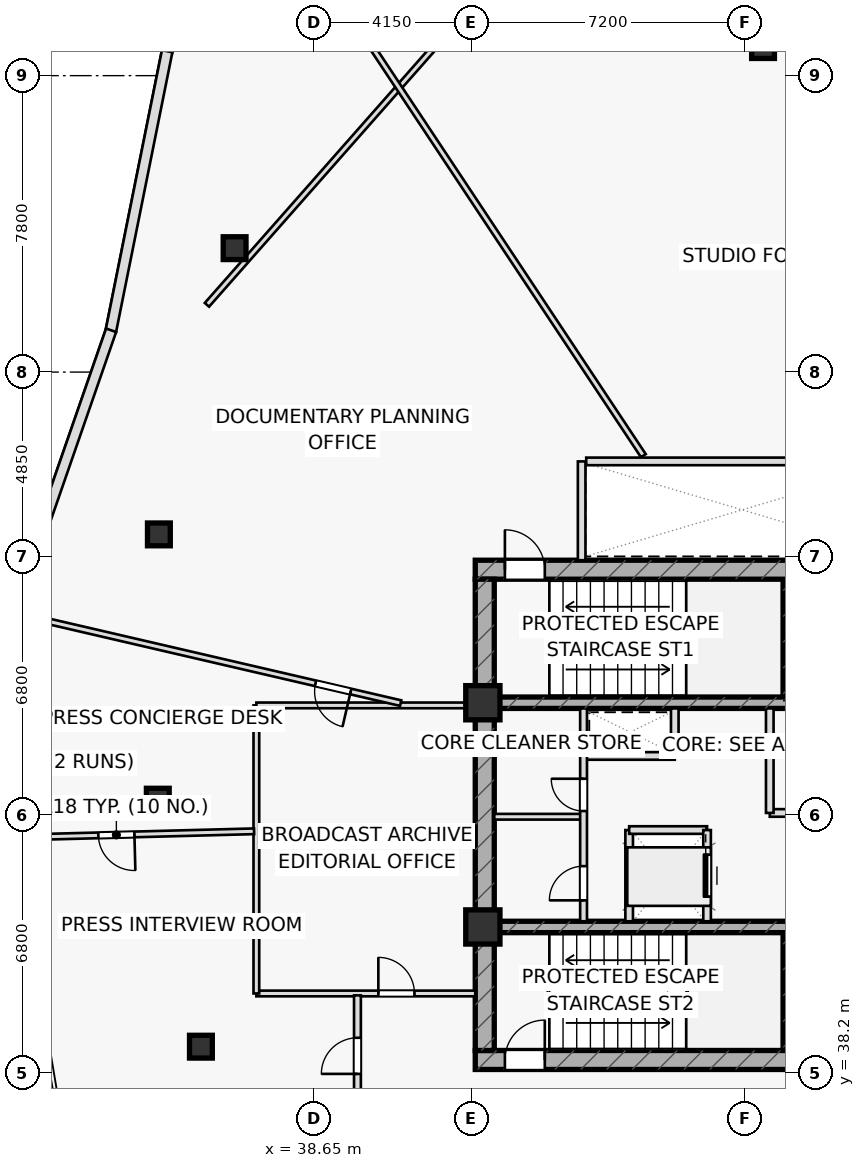
"""IFC4 building model, lengths in metres.
Left out: names, types, materials, properties, quantities, classifications, styles, units other than length and angle.
Written with IfcOpenShell. Run it as: python <this file> out.ifc"""

import sys

from ifc_helpers import new_model, si_unit, direction, frame, frame_2d, origin, origin_2d, place, context, subcontext, project, spatial, rectangle, hollow_rectangle, extrude, element, fill, save


model = new_model("IFC4")
c1 = context("Model", 3, precision=1e-05, world=origin(), true_north=direction((0.0, 1.0)))
c2 = subcontext(c1, "Body", "Model", "MODEL_VIEW")
j1 = project(units=[si_unit("LENGTHUNIT", "METRE"), si_unit("PLANEANGLEUNIT", "RADIAN")], contexts=[c1])
p1 = place(None, origin())
s1 = spatial("IfcSite", under=j1, at=p1, CompositionType="ELEMENT")
p2 = place(p1, origin())
s2 = spatial("IfcBuilding", under=s1, at=p2, CompositionType="ELEMENT")
p3 = place(p2, frame((0.0, 0.0, 184.9)))
s3 = spatial("IfcBuildingStorey", under=s2, at=p3, CompositionType="ELEMENT", Elevation=184.9)
for number, where, z_axis, x_axis in (
    (1, (51.11, 48.1, 0.0), (0.0, 0.0, 1.0), (0.0, 1.0, 0.0)),
    (2, (51.11, 38.8, 0.0), (0.0, 0.0, 1.0), (0.0, 1.0, 0.0)),
):
    element("IfcWall", number, at=place(p3, frame(where, z_axis=z_axis, x_axis=x_axis)), inside=s3, PredefinedType="SHEAR", context=c2, shape_type="SweptSolid", body=[
        extrude(rectangle(XDim=3.1, YDim=0.22, at=frame_2d((1.55, 0.0))), origin(), (0.0, 0.0, 1.0), 3.55),
    ])
p4 = place(p3, frame((42.9, 51.45, 0.0), z_axis=(0.0, 0.0, 1.0), x_axis=(1.0, 0.0, 0.0)))
e3 = element("IfcWall", 3, at=p4, inside=s3, PredefinedType="SHEAR", context=c2, shape_type="SweptSolid", body=[
    extrude(rectangle(XDim=14.2, YDim=0.5, at=frame_2d((7.1, 0.0))), origin(), (0.0, 0.0, 1.0), 3.55),
])
p5 = place(p4, frame((0.78, 0.0, 0.0)))
e4 = element("IfcOpeningElement", 4, at=p5, cuts=e3, PredefinedType="OPENING", context=c2, shape_type="SweptSolid", body=[
    extrude(rectangle(XDim=1.05, YDim=2.2, at=frame_2d((0.525, 1.1))), frame((0.0, 0.26, 0.0), z_axis=(0.0, -1.0, 0.0), x_axis=(1.0, 0.0, 0.0)), (0.0, 0.0, 1.0), 0.52),
])
p6 = place(p3, frame((42.9, 38.55, 0.0), z_axis=(0.0, 0.0, 1.0), x_axis=(1.0, 0.0, 0.0)))
e5 = element("IfcWall", 5, at=p6, inside=s3, PredefinedType="SHEAR", context=c2, shape_type="SweptSolid", body=[
    extrude(rectangle(XDim=14.2, YDim=0.5, at=frame_2d((7.1, 0.0))), origin(), (0.0, 0.0, 1.0), 3.55),
])
p7 = place(p6, frame((0.78, 0.0, 0.0)))
e6 = element("IfcOpeningElement", 6, at=p7, cuts=e5, PredefinedType="OPENING", context=c2, shape_type="SweptSolid", body=[
    extrude(rectangle(XDim=1.05, YDim=2.2, at=frame_2d((0.525, 1.1))), frame((0.0, 0.26, 0.0), z_axis=(0.0, -1.0, 0.0), x_axis=(1.0, 0.0, 0.0)), (0.0, 0.0, 1.0), 0.52),
])
p8 = place(p3, frame((43.15, 38.8, 0.0), z_axis=(0.0, 0.0, 1.0), x_axis=(0.0, 1.0, 0.0)))
e7 = element("IfcWall", 7, at=p8, inside=s3, PredefinedType="SHEAR", context=c2, shape_type="SweptSolid", body=[
    extrude(rectangle(XDim=12.4, YDim=0.5, at=frame_2d((6.2, 0.0))), origin(), (0.0, 0.0, 1.0), 3.55),
])
p9 = place(p3, frame((43.4, 47.95, 0.0), z_axis=(0.0, 0.0, 1.0), x_axis=(1.0, 0.0, 0.0)))
e8 = element("IfcWall", 8, at=p9, inside=s3, PredefinedType="SHEAR", context=c2, shape_type="SweptSolid", body=[
    extrude(rectangle(XDim=13.2, YDim=0.3, at=frame_2d((6.6, 0.0))), origin(), (0.0, 0.0, 1.0), 3.55),
])
p10 = place(p9, frame((8.345, 0.0, 0.0)))
e9 = element("IfcOpeningElement", 9, at=p10, cuts=e8, PredefinedType="OPENING", context=c2, shape_type="SweptSolid", body=[
    extrude(rectangle(XDim=1.15, YDim=2.2, at=frame_2d((0.575, 1.1))), frame((0.0, 0.16, 0.0), z_axis=(0.0, -1.0, 0.0), x_axis=(1.0, 0.0, 0.0)), (0.0, 0.0, 1.0), 0.32),
])
p11 = place(p9, frame((10.065, 0.0, 0.0)))
e10 = element("IfcOpeningElement", 10, at=p11, cuts=e8, PredefinedType="OPENING", context=c2, shape_type="SweptSolid", body=[
    extrude(rectangle(XDim=1.15, YDim=2.2, at=frame_2d((0.575, 1.1))), frame((0.0, 0.16, 0.0), z_axis=(0.0, -1.0, 0.0), x_axis=(1.0, 0.0, 0.0)), (0.0, 0.0, 1.0), 0.32),
])
p12 = place(p9, frame((11.645, 0.0, 0.0)))
e11 = element("IfcOpeningElement", 11, at=p12, cuts=e8, PredefinedType="OPENING", context=c2, shape_type="SweptSolid", body=[
    extrude(rectangle(XDim=1.15, YDim=2.2, at=frame_2d((0.575, 1.1))), frame((0.0, 0.16, 0.0), z_axis=(0.0, -1.0, 0.0), x_axis=(1.0, 0.0, 0.0)), (0.0, 0.0, 1.0), 0.32),
])
p13 = place(p3, frame((43.4, 42.05, 0.0), z_axis=(0.0, 0.0, 1.0), x_axis=(1.0, 0.0, 0.0)))
e12 = element("IfcWall", 12, at=p13, inside=s3, PredefinedType="SHEAR", context=c2, shape_type="SweptSolid", body=[
    extrude(rectangle(XDim=13.2, YDim=0.3, at=frame_2d((6.6, 0.0))), origin(), (0.0, 0.0, 1.0), 3.55),
])
p14 = place(p13, frame((8.37, 0.0, 0.0)))
e13 = element("IfcOpeningElement", 13, at=p14, cuts=e12, PredefinedType="OPENING", context=c2, shape_type="SweptSolid", body=[
    extrude(rectangle(XDim=1.1, YDim=2.15, at=frame_2d((0.55, 1.075))), frame((0.0, 0.16, 0.0), z_axis=(0.0, -1.0, 0.0), x_axis=(1.0, 0.0, 0.0)), (0.0, 0.0, 1.0), 0.32),
])
p15 = place(p13, frame((10.09, 0.0, 0.0)))
e14 = element("IfcOpeningElement", 14, at=p15, cuts=e12, PredefinedType="OPENING", context=c2, shape_type="SweptSolid", body=[
    extrude(rectangle(XDim=1.1, YDim=2.15, at=frame_2d((0.55, 1.075))), frame((0.0, 0.16, 0.0), z_axis=(0.0, -1.0, 0.0), x_axis=(1.0, 0.0, 0.0)), (0.0, 0.0, 1.0), 0.32),
])
p16 = place(p13, frame((11.83, 0.0, 0.0)))
e15 = element("IfcOpeningElement", 15, at=p16, cuts=e12, PredefinedType="OPENING", context=c2, shape_type="SweptSolid", body=[
    extrude(rectangle(XDim=1.1, YDim=2.15, at=frame_2d((0.55, 1.075))), frame((0.0, 0.16, 0.0), z_axis=(0.0, -1.0, 0.0), x_axis=(1.0, 0.0, 0.0)), (0.0, 0.0, 1.0), 0.32),
])
for number, where, z_axis, x_axis in (
    (16, (43.1, 47.95, 0.0), (0.0, 0.0, 1.0), (1.0, 0.0, 0.0)),
    (17, (43.1, 42.05, 0.0), (0.0, 0.0, 1.0), (1.0, 0.0, 0.0)),
):
    element("IfcColumn", number, at=place(p3, frame(where, z_axis=z_axis, x_axis=x_axis)), inside=s3, PredefinedType="COLUMN", context=c2, shape_type="SweptSolid", body=[
        extrude(rectangle(XDim=0.9, YDim=0.9, at=origin_2d()), origin(), (0.0, 0.0, 1.0), 3.55),
    ])
for number, where, z_axis, x_axis in (
    (18, (36.568, 59.911, 0.0), (0.0, 0.0, 1.0), (1.0, 0.0, 0.0)),
    (19, (34.575, 52.379, 0.0), (0.0, 0.0, 1.0), (1.0, 0.0, 0.0)),
    (20, (34.546, 45.399, 0.0), (0.0, 0.0, 1.0), (1.0, 0.0, 0.0)),
    (21, (35.681, 38.9, 0.0), (0.0, 0.0, 1.0), (1.0, 0.0, 0.0)),
    (22, (50.472, 65.202, 0.0), (0.0, 0.0, 1.0), (1.0, 0.0, 0.0)),
):
    element("IfcColumn", number, at=place(p3, frame(where, z_axis=z_axis, x_axis=x_axis)), inside=s3, PredefinedType="COLUMN", context=c2, shape_type="SweptSolid", body=[
        extrude(hollow_rectangle(XDim=0.6, YDim=0.6, WallThickness=0.036, at=origin_2d()), origin(), (0.0, 0.0, 1.0), 3.55),
    ])
p17 = place(p3, frame((45.7, 51.7, 0.0), z_axis=(0.0, 0.0, 1.0), x_axis=(0.0, 1.0, 0.0)))
e23 = element("IfcWall", 23, at=p17, inside=s3, PredefinedType="PARTITIONING", context=c2, shape_type="SweptSolid", body=[
    extrude(rectangle(XDim=2.6, YDim=0.2, at=frame_2d((1.3, 0.0))), origin(), (0.0, 0.0, 1.0), 3.55),
])
p18 = place(p3, frame((45.75, 46.55, 0.0), z_axis=(0.0, 0.0, 1.0), x_axis=(1.0, 0.0, 0.0)))
e24 = element("IfcWall", 24, at=p18, inside=s3, PredefinedType="PARTITIONING", context=c2, shape_type="SweptSolid", body=[
    extrude(rectangle(XDim=2.4, YDim=0.2, at=frame_2d((1.2, 0.0))), origin(), (0.0, 0.0, 1.0), 3.55),
])
p19 = place(p3, frame((48.15, 46.55, 0.0), z_axis=(0.0, 0.0, 1.0), x_axis=(0.0, 1.0, 0.0)))
e25 = element("IfcWall", 25, at=p19, inside=s3, PredefinedType="PARTITIONING", context=c2, shape_type="SweptSolid", body=[
    extrude(rectangle(XDim=1.25, YDim=0.2, at=frame_2d((0.625, 0.0))), origin(), (0.0, 0.0, 1.0), 3.55),
])
p20 = place(p3, frame((46.95, 42.2, 0.0), z_axis=(0.0, 0.0, 1.0), x_axis=(0.0, 1.0, 0.0)))
e26 = element("IfcWall", 26, at=p20, inside=s3, PredefinedType="PARTITIONING", context=c2, shape_type="SweptSolid", body=[
    extrude(rectangle(XDim=2.4, YDim=0.2, at=frame_2d((1.2, 0.0))), origin(), (0.0, 0.0, 1.0), 3.55),
])
p21 = place(p3, frame((46.95, 44.6, 0.0), z_axis=(0.0, 0.0, 1.0), x_axis=(1.0, 0.0, 0.0)))
e27 = element("IfcWall", 27, at=p21, inside=s3, PredefinedType="PARTITIONING", context=c2, shape_type="SweptSolid", body=[
    extrude(rectangle(XDim=2.05, YDim=0.2, at=frame_2d((1.025, 0.0))), origin(), (0.0, 0.0, 1.0), 3.55),
])
p22 = place(p3, frame((50.65, 45.05, 0.0), z_axis=(0.0, 0.0, 1.0), x_axis=(1.0, 0.0, 0.0)))
e28 = element("IfcWall", 28, at=p22, inside=s3, PredefinedType="PARTITIONING", context=c2, shape_type="SweptSolid", body=[
    extrude(rectangle(XDim=5.95, YDim=0.2, at=frame_2d((2.975, 0.0))), origin(), (0.0, 0.0, 1.0), 3.55),
])
p23 = place(p22, frame((1.35, 0.0, 0.0)))
e29 = element("IfcOpeningElement", 29, at=p23, cuts=e28, PredefinedType="OPENING", context=c2, shape_type="SweptSolid", body=[
    extrude(rectangle(XDim=1.5, YDim=2.2, at=frame_2d((0.75, 1.1))), frame((0.0, 0.11, 0.0), z_axis=(0.0, -1.0, 0.0), x_axis=(1.0, 0.0, 0.0)), (0.0, 0.0, 1.0), 0.22),
])
p24 = place(p3, frame((50.65, 45.05, 0.0), z_axis=(0.0, 0.0, 1.0), x_axis=(0.0, 1.0, 0.0)))
e30 = element("IfcWall", 30, at=p24, inside=s3, PredefinedType="PARTITIONING", context=c2, shape_type="SweptSolid", body=[
    extrude(rectangle(XDim=2.75, YDim=0.2, at=frame_2d((1.375, 0.0))), origin(), (0.0, 0.0, 1.0), 3.55),
])
p25 = place(p3, frame((43.4, 44.95, 0.0), z_axis=(0.0, 0.0, 1.0), x_axis=(1.0, 0.0, 0.0)))
e31 = element("IfcWall", 31, at=p25, inside=s3, PredefinedType="PARTITIONING", context=c2, shape_type="SweptSolid", body=[
    extrude(rectangle(XDim=2.35, YDim=0.15, at=frame_2d((1.175, 0.0))), origin(), (0.0, 0.0, 1.0), 3.55),
])
p26 = place(p3, frame((45.75, 42.2, 0.0), z_axis=(0.0, 0.0, 1.0), x_axis=(0.0, 1.0, 0.0)))
e32 = element("IfcWall", 32, at=p26, inside=s3, PredefinedType="PARTITIONING", context=c2, shape_type="SweptSolid", body=[
    extrude(rectangle(XDim=5.6, YDim=0.18, at=frame_2d((2.8, 0.0))), origin(), (0.0, 0.0, 1.0), 3.55),
])
p27 = place(p26, frame((0.55, 0.0, 0.0)))
e33 = element("IfcOpeningElement", 33, at=p27, cuts=e32, PredefinedType="OPENING", context=c2, shape_type="SweptSolid", body=[
    extrude(rectangle(XDim=0.9, YDim=2.05, at=frame_2d((0.45, 1.025))), frame((0.0, 0.1, 0.0), z_axis=(0.0, -1.0, 0.0), x_axis=(1.0, 0.0, 0.0)), (0.0, 0.0, 1.0), 0.2),
])
p28 = place(p26, frame((2.9, 0.0, 0.0)))
e34 = element("IfcOpeningElement", 34, at=p28, cuts=e32, PredefinedType="OPENING", context=c2, shape_type="SweptSolid", body=[
    extrude(rectangle(XDim=0.85, YDim=2.05, at=frame_2d((0.425, 1.025))), frame((0.0, 0.1, 0.0), z_axis=(0.0, -1.0, 0.0), x_axis=(1.0, 0.0, 0.0)), (0.0, 0.0, 1.0), 0.2),
])
p29 = place(p3, frame((43.4, 66.989, 0.0), z_axis=(0.0, 0.0, 1.0), x_axis=(-0.661622343701, -0.749837231881, 0.0)))
e35 = element("IfcWall", 35, at=p29, inside=s3, PredefinedType="PARTITIONING", context=c2, shape_type="SweptSolid", body=[
    extrude(rectangle(XDim=11.427, YDim=0.15, at=frame_2d((5.714, 0.0))), origin(), (0.0, 0.0, 1.0), 2.935),
])
p30 = place(p3, frame((37.14, 40.3, 0.0), z_axis=(0.0, 0.0, 1.0), x_axis=(1.0, 0.0, 0.0)))
e36 = element("IfcWall", 36, at=p30, inside=s3, PredefinedType="PARTITIONING", context=c2, shape_type="SweptSolid", body=[
    extrude(rectangle(XDim=5.76, YDim=0.15, at=frame_2d((2.88, 0.0))), origin(), (0.0, 0.0, 1.0), 3.55),
])
p31 = place(p30, frame((3.21, 0.0, 0.0)))
e37 = element("IfcOpeningElement", 37, at=p31, cuts=e36, PredefinedType="OPENING", context=c2, shape_type="SweptSolid", body=[
    extrude(rectangle(XDim=0.95, YDim=2.05, at=frame_2d((0.475, 1.025))), frame((0.0, 0.085, 0.0), z_axis=(0.0, -1.0, 0.0), x_axis=(1.0, 0.0, 0.0)), (0.0, 0.0, 1.0), 0.17),
])
p32 = place(p3, frame((37.14, 40.3, 0.0), z_axis=(0.0, 0.0, 1.0), x_axis=(0.0, 1.0, 0.0)))
e38 = element("IfcWall", 38, at=p32, inside=s3, PredefinedType="PARTITIONING", context=c2, shape_type="SweptSolid", body=[
    extrude(rectangle(XDim=7.58, YDim=0.15, at=frame_2d((3.79, 0.0))), origin(), (0.0, 0.0, 1.0), 2.935),
])
p33 = place(p3, frame((37.14, 47.88, 0.0), z_axis=(0.0, 0.0, 1.0), x_axis=(1.0, 0.0, 0.0)))
e39 = element("IfcWall", 39, at=p33, inside=s3, PredefinedType="PARTITIONING", context=c2, shape_type="SweptSolid", body=[
    extrude(rectangle(XDim=5.76, YDim=0.15, at=frame_2d((2.88, 0.0))), origin(), (0.0, 0.0, 1.0), 2.935),
])
p34 = place(p3, frame((37.08, 44.567, 0.0), z_axis=(0.0, 0.0, 1.0), x_axis=(-0.999658109606, -0.026146967282, 0.0)))
e40 = element("IfcWall", 40, at=p34, inside=s3, PredefinedType="PARTITIONING", context=c2, shape_type="SweptSolid", body=[
    extrude(rectangle(XDim=6.191, YDim=0.15, at=frame_2d((3.095, 0.0))), origin(), (0.0, 0.0, 1.0), 3.025),
])
p35 = place(p34, frame((3.15, 0.0, 0.0)))
e41 = element("IfcOpeningElement", 41, at=p35, cuts=e40, PredefinedType="OPENING", context=c2, shape_type="SweptSolid", body=[
    extrude(rectangle(XDim=0.95, YDim=2.05, at=frame_2d((0.475, 1.025))), frame((0.0, 0.085, 0.0), z_axis=(0.0, -1.0, 0.0), x_axis=(1.0, 0.0, 0.0)), (0.0, 0.0, 1.0), 0.17),
])
p36 = place(p3, frame((47.324, 54.45, 0.0), z_axis=(0.0, 0.0, 1.0), x_axis=(-0.553219076903, 0.833035805324, 0.0)))
e42 = element("IfcWall", 42, at=p36, inside=s3, PredefinedType="PARTITIONING", context=c2, shape_type="SweptSolid", body=[
    extrude(rectangle(XDim=17.28, YDim=0.15, at=frame_2d((8.64, 0.0))), origin(), (0.0, 0.0, 1.0), 2.935),
])
p37 = place(p3, frame((40.937, 47.94, 0.0), z_axis=(0.0, 0.0, 1.0), x_axis=(-0.974091245641, 0.226155356263, 0.0)))
e43 = element("IfcWall", 43, at=p37, inside=s3, PredefinedType="PARTITIONING", context=c2, shape_type="SweptSolid", body=[
    extrude(rectangle(XDim=10.483, YDim=0.15, at=frame_2d((5.242, 0.0))), origin(), (0.0, 0.0, 1.0), 2.935),
])
p38 = place(p37, frame((1.35, 0.0, 0.0)))
e44 = element("IfcOpeningElement", 44, at=p38, cuts=e43, PredefinedType="OPENING", context=c2, shape_type="SweptSolid", body=[
    extrude(rectangle(XDim=0.95, YDim=2.05, at=frame_2d((0.475, 1.025))), frame((0.0, 0.085, 0.0), z_axis=(0.0, -1.0, 0.0), x_axis=(1.0, 0.0, 0.0)), (0.0, 0.0, 1.0), 0.17),
])
p39 = place(p3, frame((39.8, 36.05, 0.0), z_axis=(0.0, 0.0, 1.0), x_axis=(0.0, 1.0, 0.0)))
e45 = element("IfcWall", 45, at=p39, inside=s3, PredefinedType="PARTITIONING", context=c2, shape_type="SweptSolid", body=[
    extrude(rectangle(XDim=4.2, YDim=0.18, at=frame_2d((2.1, 0.0))), origin(), (0.0, 0.0, 1.0), 2.935),
])
p40 = place(p39, frame((2.134, 0.0, 0.0)))
e46 = element("IfcOpeningElement", 46, at=p40, cuts=e45, PredefinedType="OPENING", context=c2, shape_type="SweptSolid", body=[
    extrude(rectangle(XDim=0.95, YDim=2.05, at=frame_2d((0.475, 1.025))), frame((0.0, 0.1, 0.0), z_axis=(0.0, -1.0, 0.0), x_axis=(1.0, 0.0, 0.0)), (0.0, 0.0, 1.0), 0.2),
])
p41 = place(p3, frame((35.376, 66.932, 0.0), z_axis=(0.0, 0.0, 1.0), x_axis=(-0.301536846472, -0.953454524463, 0.0)))
e47 = element("IfcWall", 47, at=p41, inside=s3, PredefinedType="STANDARD", context=c2, shape_type="SweptSolid", body=[
    extrude(rectangle(XDim=1.959, YDim=0.28, at=frame_2d((0.98, 0.0))), origin(), (0.0, 0.0, 1.0), 3.55),
])
p42 = place(p3, frame((34.793, 65.093, 0.0), z_axis=(0.0, 0.0, 1.0), x_axis=(-0.197271084359, -0.980348978311, 0.0)))
e48 = element("IfcWall", 48, at=p42, inside=s3, PredefinedType="STANDARD", context=c2, shape_type="SweptSolid", body=[
    extrude(rectangle(XDim=7.52, YDim=0.28, at=frame_2d((3.76, 0.0))), origin(), (0.0, 0.0, 1.0), 3.55),
])
p43 = place(p3, frame((33.317, 57.75, 0.0), z_axis=(0.0, 0.0, 1.0), x_axis=(-0.327808231871, -0.944744284512, 0.0)))
e49 = element("IfcWall", 49, at=p43, inside=s3, PredefinedType="STANDARD", context=c2, shape_type="SweptSolid", body=[
    extrude(rectangle(XDim=8.136, YDim=0.28, at=frame_2d((4.068, 0.0))), origin(), (0.0, 0.0, 1.0), 3.55),
])
p44 = place(p3, frame((49.0, 42.2, 0.0), z_axis=(0.0, 0.0, 1.0), x_axis=(0.0, 1.0, 0.0)))
e50 = element("IfcWall", 50, at=p44, inside=s3, PredefinedType="PARTITIONING", context=c2, shape_type="SweptSolid", body=[
    extrude(rectangle(XDim=2.4, YDim=0.2, at=frame_2d((1.2, 0.0))), origin(), (0.0, 0.0, 1.0), 3.55),
])
p45 = place(p44, frame((0.65, 0.0, 0.0)))
e51 = element("IfcOpeningElement", 51, at=p45, cuts=e50, PredefinedType="OPENING", context=c2, shape_type="SweptSolid", body=[
    extrude(rectangle(XDim=1.1, YDim=2.15, at=frame_2d((0.55, 1.075))), frame((0.0, 0.11, 0.0), z_axis=(0.0, -1.0, 0.0), x_axis=(1.0, 0.0, 0.0)), (0.0, 0.0, 1.0), 0.22),
])
p46 = place(p3, frame((45.82, 54.3, 0.0), z_axis=(0.0, 0.0, 1.0), x_axis=(1.0, 0.0, 0.0)))
e52 = element("IfcWall", 52, at=p46, inside=s3, PredefinedType="PARTITIONING", context=c2, shape_type="SweptSolid", body=[
    extrude(rectangle(XDim=8.31, YDim=0.2, at=frame_2d((4.155, 0.0))), origin(), (0.0, 0.0, 1.0), 3.55),
])
p47 = place(p5, origin())
e53 = element("IfcDoor", 53, at=p47, inside=s3, OperationType="SINGLE_SWING_LEFT", PredefinedType="DOOR", context=c2, shape_type="SweptSolid", body=[
    extrude(rectangle(XDim=1.05, YDim=2.2, at=frame_2d((0.525, 1.1))), frame((0.0, 0.025, 0.0), z_axis=(0.0, -1.0, 0.0), x_axis=(1.0, 0.0, 0.0)), (0.0, 0.0, 1.0), 0.05),
])
fill(e4, e53)
p48 = place(p7, origin())
e54 = element("IfcDoor", 54, at=p48, inside=s3, OperationType="SINGLE_SWING_RIGHT", PredefinedType="DOOR", context=c2, shape_type="SweptSolid", body=[
    extrude(rectangle(XDim=1.05, YDim=2.2, at=frame_2d((0.525, 1.1))), frame((0.0, 0.025, 0.0), z_axis=(0.0, -1.0, 0.0), x_axis=(1.0, 0.0, 0.0)), (0.0, 0.0, 1.0), 0.05),
])
fill(e6, e54)
p49 = place(p27, origin())
e55 = element("IfcDoor", 55, at=p49, inside=s3, OperationType="SINGLE_SWING_LEFT", PredefinedType="DOOR", context=c2, shape_type="SweptSolid", body=[
    extrude(rectangle(XDim=0.9, YDim=2.05, at=frame_2d((0.45, 1.025))), frame((0.0, 0.025, 0.0), z_axis=(0.0, -1.0, 0.0), x_axis=(1.0, 0.0, 0.0)), (0.0, 0.0, 1.0), 0.05),
])
fill(e33, e55)
p50 = place(p28, origin())
e56 = element("IfcDoor", 56, at=p50, inside=s3, OperationType="SINGLE_SWING_RIGHT", PredefinedType="DOOR", context=c2, shape_type="SweptSolid", body=[
    extrude(rectangle(XDim=0.85, YDim=2.05, at=frame_2d((0.425, 1.025))), frame((0.0, 0.025, 0.0), z_axis=(0.0, -1.0, 0.0), x_axis=(1.0, 0.0, 0.0)), (0.0, 0.0, 1.0), 0.05),
])
fill(e34, e56)
p51 = place(p31, origin())
e57 = element("IfcDoor", 57, at=p51, inside=s3, OperationType="SINGLE_SWING_LEFT", PredefinedType="DOOR", context=c2, shape_type="SweptSolid", body=[
    extrude(rectangle(XDim=0.95, YDim=2.05, at=frame_2d((0.475, 1.025))), frame((0.0, 0.025, 0.0), z_axis=(0.0, -1.0, 0.0), x_axis=(1.0, 0.0, 0.0)), (0.0, 0.0, 1.0), 0.05),
])
fill(e37, e57)
p52 = place(p35, origin())
e58 = element("IfcDoor", 58, at=p52, inside=s3, OperationType="SINGLE_SWING_LEFT", PredefinedType="DOOR", context=c2, shape_type="SweptSolid", body=[
    extrude(rectangle(XDim=0.95, YDim=2.05, at=frame_2d((0.475, 1.025))), frame((0.0, 0.025, 0.0), z_axis=(0.0, -1.0, 0.0), x_axis=(1.0, 0.0, 0.0)), (0.0, 0.0, 1.0), 0.05),
])
fill(e41, e58)
p53 = place(p38, origin())
e59 = element("IfcDoor", 59, at=p53, inside=s3, OperationType="SINGLE_SWING_LEFT", PredefinedType="DOOR", context=c2, shape_type="SweptSolid", body=[
    extrude(rectangle(XDim=0.95, YDim=2.05, at=frame_2d((0.475, 1.025))), frame((0.0, 0.025, 0.0), z_axis=(0.0, -1.0, 0.0), x_axis=(1.0, 0.0, 0.0)), (0.0, 0.0, 1.0), 0.05),
])
fill(e44, e59)
p54 = place(p40, origin())
e60 = element("IfcDoor", 60, at=p54, inside=s3, OperationType="SINGLE_SWING_LEFT", PredefinedType="DOOR", context=c2, shape_type="SweptSolid", body=[
    extrude(rectangle(XDim=0.95, YDim=2.05, at=frame_2d((0.475, 1.025))), frame((0.0, 0.025, 0.0), z_axis=(0.0, -1.0, 0.0), x_axis=(1.0, 0.0, 0.0)), (0.0, 0.0, 1.0), 0.05),
])
fill(e46, e60)
p55 = place(p45, origin())
e61 = element("IfcDoor", 61, at=p55, inside=s3, OperationType="SLIDING_TO_RIGHT", PredefinedType="DOOR", context=c2, shape_type="SweptSolid", body=[
    extrude(rectangle(XDim=1.1, YDim=2.15, at=frame_2d((0.55, 1.075))), frame((0.0, 0.025, 0.0), z_axis=(0.0, -1.0, 0.0), x_axis=(1.0, 0.0, 0.0)), (0.0, 0.0, 1.0), 0.05),
])
fill(e51, e61)
save(model, sys.argv[1])
